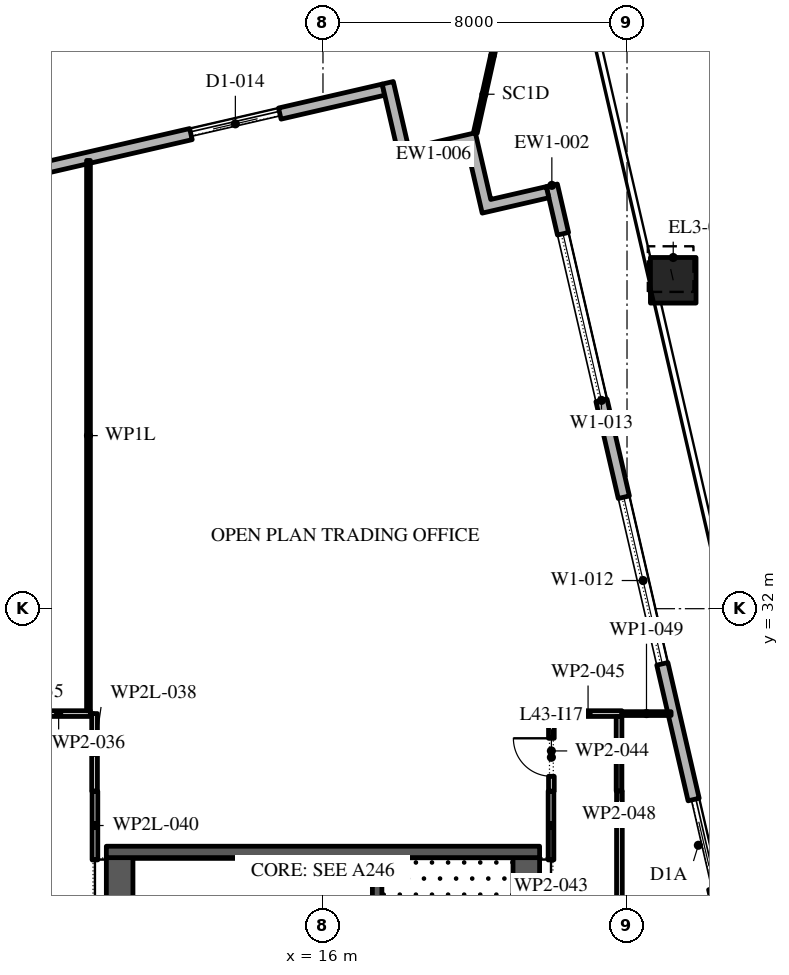
"""IFC4 building model, lengths in metres.
Left out: names, types, materials, properties, quantities, classifications, styles, units other than length and angle.
Written with IfcOpenShell. Run it as: python <this file> out.ifc"""

import sys

from ifc_helpers import new_model, si_unit, direction, frame, frame_2d, origin, origin_2d, place, context, subcontext, project, spatial, polyline, rectangle, outline, extrude, element, fill, save


model = new_model("IFC4")
c1 = context("Model", 3, precision=1e-05, world=origin(), true_north=direction((0.0, 1.0)))
c2 = subcontext(c1, "Body", "Model", "MODEL_VIEW")
j1 = project(units=[si_unit("LENGTHUNIT", "METRE"), si_unit("PLANEANGLEUNIT", "RADIAN")], contexts=[c1])
p1 = place(None, origin())
s1 = spatial("IfcSite", under=j1, at=p1, CompositionType="ELEMENT")
p2 = place(p1, origin())
s2 = spatial("IfcBuilding", under=s1, at=p2, CompositionType="ELEMENT")
p3 = place(p2, frame((0.0, 0.0, 196.8)))
s3 = spatial("IfcBuildingStorey", under=s2, at=p3, CompositionType="ELEMENT", Elevation=196.8)
p4 = place(p3, frame((25.216, 40.641, 0.0), z_axis=(-0.016176147103, 0.070038658424, 0.997413113304), x_axis=(-0.97435039746, -0.225036225904, 0.0)))
e1 = element("IfcColumn", 1, at=p4, inside=s3, PredefinedType="COLUMN", context=c2, shape_type="SweptSolid", body=[
    extrude(rectangle(XDim=1.2, YDim=1.2, at=origin_2d()), origin(), (0.0, 0.0, 1.0), 4.211),
])
p5 = place(p3, frame((33.157, -5.092, 0.0), z_axis=(0.0, 0.0, 1.0), x_axis=(-0.224950279389, 0.974370243697, 0.0)))
e2 = element("IfcWall", 2, at=p5, inside=s3, PredefinedType="STANDARD", context=c2, shape_type="SweptSolid", body=[
    extrude(rectangle(XDim=49.5, YDim=0.3, at=frame_2d((24.75, 0.0))), origin(), (0.0, 0.0, 1.0), 4.0),
])
p6 = place(p5, frame((2.207, 0.0, 0.0)))
e3 = element("IfcOpeningElement", 3, at=p6, cuts=e2, PredefinedType="OPENING", context=c2, shape_type="SweptSolid", body=[
    extrude(rectangle(XDim=2.4, YDim=3.125, at=frame_2d((1.2, 1.562))), frame((0.0, 0.16, 0.0), z_axis=(0.0, -1.0, 0.0), x_axis=(1.0, 0.0, 0.0)), (0.0, 0.0, 1.0), 0.32),
])
p7 = place(p5, frame((8.121, 0.0, 0.45)))
e4 = element("IfcOpeningElement", 4, at=p7, cuts=e2, PredefinedType="OPENING", context=c2, shape_type="SweptSolid", body=[
    extrude(rectangle(XDim=4.5, YDim=2.875, at=frame_2d((2.25, 1.438))), frame((0.0, 0.16, 0.0), z_axis=(0.0, -1.0, 0.0), x_axis=(1.0, 0.0, 0.0)), (0.0, 0.0, 1.0), 0.32),
])
p8 = place(p5, frame((15.236, 0.0, 0.45)))
e5 = element("IfcOpeningElement", 5, at=p8, cuts=e2, PredefinedType="OPENING", context=c2, shape_type="SweptSolid", body=[
    extrude(rectangle(XDim=4.5, YDim=2.875, at=frame_2d((2.25, 1.438))), frame((0.0, 0.16, 0.0), z_axis=(0.0, -1.0, 0.0), x_axis=(1.0, 0.0, 0.0)), (0.0, 0.0, 1.0), 0.32),
])
p9 = place(p5, frame((22.35, 0.0, 0.45)))
e6 = element("IfcOpeningElement", 6, at=p9, cuts=e2, PredefinedType="OPENING", context=c2, shape_type="SweptSolid", body=[
    extrude(rectangle(XDim=4.5, YDim=3.0, at=frame_2d((2.25, 1.5))), frame((0.0, 0.16, 0.0), z_axis=(0.0, -1.0, 0.0), x_axis=(1.0, 0.0, 0.0)), (0.0, 0.0, 1.0), 0.32),
])
p10 = place(p5, frame((30.514, 0.0, 0.0)))
e7 = element("IfcOpeningElement", 7, at=p10, cuts=e2, PredefinedType="OPENING", context=c2, shape_type="SweptSolid", body=[
    extrude(rectangle(XDim=2.4, YDim=3.45, at=frame_2d((1.2, 1.725))), frame((0.0, 0.16, 0.0), z_axis=(0.0, -1.0, 0.0), x_axis=(1.0, 0.0, 0.0)), (0.0, 0.0, 1.0), 0.32),
])
p11 = place(p5, frame((36.579, 0.0, 0.45)))
e8 = element("IfcOpeningElement", 8, at=p11, cuts=e2, PredefinedType="OPENING", context=c2, shape_type="SweptSolid", body=[
    extrude(rectangle(XDim=4.5, YDim=3.05, at=frame_2d((2.25, 1.525))), frame((0.0, 0.16, 0.0), z_axis=(0.0, -1.0, 0.0), x_axis=(1.0, 0.0, 0.0)), (0.0, 0.0, 1.0), 0.32),
])
p12 = place(p5, frame((43.693, 0.0, 0.45)))
e9 = element("IfcOpeningElement", 9, at=p12, cuts=e2, PredefinedType="OPENING", context=c2, shape_type="SweptSolid", body=[
    extrude(rectangle(XDim=4.5, YDim=3.05, at=frame_2d((2.25, 1.525))), frame((0.0, 0.16, 0.0), z_axis=(0.0, -1.0, 0.0), x_axis=(1.0, 0.0, 0.0)), (0.0, 0.0, 1.0), 0.32),
])
p13 = place(p3, frame((17.592, 45.657, 0.0), z_axis=(0.0, 0.0, 1.0), x_axis=(-0.974370243697, -0.224950279389, 0.0)))
e10 = element("IfcWall", 10, at=p13, inside=s3, PredefinedType="STANDARD", context=c2, shape_type="SweptSolid", body=[
    extrude(rectangle(XDim=49.5, YDim=0.3, at=frame_2d((24.75, 0.0))), origin(), (0.0, 0.0, 1.0), 4.0),
])
p14 = place(p13, frame((2.8, 0.0, 0.0)))
e11 = element("IfcOpeningElement", 11, at=p14, cuts=e10, PredefinedType="OPENING", context=c2, shape_type="SweptSolid", body=[
    extrude(rectangle(XDim=2.4, YDim=3.5, at=frame_2d((1.2, 1.75))), frame((0.0, 0.16, 0.0), z_axis=(0.0, -1.0, 0.0), x_axis=(1.0, 0.0, 0.0)), (0.0, 0.0, 1.0), 0.32),
])
p15 = place(p13, frame((9.9, 0.0, 0.45)))
e12 = element("IfcOpeningElement", 12, at=p15, cuts=e10, PredefinedType="OPENING", context=c2, shape_type="SweptSolid", body=[
    extrude(rectangle(XDim=4.5, YDim=2.45, at=frame_2d((2.25, 1.225))), frame((0.0, 0.16, 0.0), z_axis=(0.0, -1.0, 0.0), x_axis=(1.0, 0.0, 0.0)), (0.0, 0.0, 1.0), 0.32),
])
p16 = place(p13, frame((18.2, 0.0, 0.45)))
e13 = element("IfcOpeningElement", 13, at=p16, cuts=e10, PredefinedType="OPENING", context=c2, shape_type="SweptSolid", body=[
    extrude(rectangle(XDim=4.5, YDim=2.45, at=frame_2d((2.25, 1.225))), frame((0.0, 0.16, 0.0), z_axis=(0.0, -1.0, 0.0), x_axis=(1.0, 0.0, 0.0)), (0.0, 0.0, 1.0), 0.32),
])
p17 = place(p13, frame((26.5, 0.0, 0.45)))
e14 = element("IfcOpeningElement", 14, at=p17, cuts=e10, PredefinedType="OPENING", context=c2, shape_type="SweptSolid", body=[
    extrude(rectangle(XDim=4.5, YDim=2.525, at=frame_2d((2.25, 1.262))), frame((0.0, 0.16, 0.0), z_axis=(0.0, -1.0, 0.0), x_axis=(1.0, 0.0, 0.0)), (0.0, 0.0, 1.0), 0.32),
])
p18 = place(p13, frame((35.85, 0.0, 0.0)))
e15 = element("IfcOpeningElement", 15, at=p18, cuts=e10, PredefinedType="OPENING", context=c2, shape_type="SweptSolid", body=[
    extrude(rectangle(XDim=2.4, YDim=3.5, at=frame_2d((1.2, 1.75))), frame((0.0, 0.16, 0.0), z_axis=(0.0, -1.0, 0.0), x_axis=(1.0, 0.0, 0.0)), (0.0, 0.0, 1.0), 0.32),
])
p19 = place(p13, frame((43.1, 0.0, 0.45)))
e16 = element("IfcOpeningElement", 16, at=p19, cuts=e10, PredefinedType="OPENING", context=c2, shape_type="SweptSolid", body=[
    extrude(rectangle(XDim=4.5, YDim=2.675, at=frame_2d((2.25, 1.337))), frame((0.0, 0.16, 0.0), z_axis=(0.0, -1.0, 0.0), x_axis=(1.0, 0.0, 0.0)), (0.0, 0.0, 1.0), 0.32),
])
p20 = place(p3, origin())
e17 = element("IfcWall", 17, at=p20, inside=s3, PredefinedType="STANDARD", context=c2, shape_type="SweptSolid", body=[
    extrude(outline(polyline([(19.785, 44.162), (18.031, 43.757), (17.558, 45.803), (17.851, 45.871), (18.256, 44.117), (20.01, 44.522), (20.414, 42.768), (21.876, 43.105), (21.943, 42.813), (20.19, 42.408), (19.785, 44.162)])), origin(), (0.0, 0.0, 1.0), 4.0),
])
p21 = place(p3, frame((20.01, 44.522, -0.05), z_axis=(0.0, 0.0, 1.0), x_axis=(0.217129502509, 0.976142806735, 0.0)))
e18 = element("IfcWall", 18, at=p21, inside=s3, PredefinedType="STANDARD", context=c2, shape_type="SweptSolid", body=[
    extrude(rectangle(XDim=2.078, YDim=0.1, at=frame_2d((1.039, 0.0))), origin(), (0.0, 0.0, 1.0), 3.07),
])
p22 = place(p3, frame((21.35, -2.45, 0.0), z_axis=(0.0, 0.0, 1.0), x_axis=(0.0, 1.0, 0.0)))
e19 = element("IfcWall", 19, at=p22, inside=s3, PredefinedType="SHEAR", context=c2, shape_type="SweptSolid", body=[
    extrude(rectangle(XDim=27.9, YDim=0.7, at=frame_2d((13.95, 0.0))), origin(), (0.0, 0.0, 1.0), 4.0),
])
p23 = place(p22, frame((5.05, 0.0, 0.0)))
e20 = element("IfcOpeningElement", 20, at=p23, cuts=e19, PredefinedType="OPENING", context=c2, shape_type="SweptSolid", body=[
    extrude(rectangle(XDim=1.2, YDim=2.1, at=frame_2d((0.6, 1.05))), frame((0.0, 0.36, 0.0), z_axis=(0.0, -1.0, 0.0), x_axis=(1.0, 0.0, 0.0)), (0.0, 0.0, 1.0), 0.72),
])
p24 = place(p22, frame((21.65, 0.0, 0.0)))
e21 = element("IfcOpeningElement", 21, at=p24, cuts=e19, PredefinedType="OPENING", context=c2, shape_type="SweptSolid", body=[
    extrude(rectangle(XDim=1.2, YDim=2.1, at=frame_2d((0.6, 1.05))), frame((0.0, 0.36, 0.0), z_axis=(0.0, -1.0, 0.0), x_axis=(1.0, 0.0, 0.0)), (0.0, 0.0, 1.0), 0.72),
])
p25 = place(p3, frame((10.65, -2.45, 0.0), z_axis=(0.0, 0.0, 1.0), x_axis=(0.0, 1.0, 0.0)))
e22 = element("IfcWall", 22, at=p25, inside=s3, PredefinedType="SHEAR", context=c2, shape_type="SweptSolid", body=[
    extrude(rectangle(XDim=27.9, YDim=0.7, at=frame_2d((13.95, 0.0))), origin(), (0.0, 0.0, 1.0), 4.0),
])
p26 = place(p25, frame((23.65, 0.0, 0.0)))
e23 = element("IfcOpeningElement", 23, at=p26, cuts=e22, PredefinedType="OPENING", context=c2, shape_type="SweptSolid", body=[
    extrude(rectangle(XDim=2.4, YDim=2.1, at=frame_2d((1.2, 1.05))), frame((0.0, 0.36, 0.0), z_axis=(0.0, -1.0, 0.0), x_axis=(1.0, 0.0, 0.0)), (0.0, 0.0, 1.0), 0.72),
])
p27 = place(p25, frame((0.788, 0.0, 0.0)))
e24 = element("IfcOpeningElement", 24, at=p27, cuts=e22, PredefinedType="OPENING", context=c2, shape_type="SweptSolid", body=[
    extrude(rectangle(XDim=0.9, YDim=2.1, at=frame_2d((0.45, 1.05))), frame((0.0, 0.36, 0.0), z_axis=(0.0, -1.0, 0.0), x_axis=(1.0, 0.0, 0.0)), (0.0, 0.0, 1.0), 0.72),
])
p28 = place(p25, frame((3.962, 0.0, 0.0)))
e25 = element("IfcOpeningElement", 25, at=p28, cuts=e22, PredefinedType="OPENING", context=c2, shape_type="SweptSolid", body=[
    extrude(rectangle(XDim=1.0, YDim=2.1, at=frame_2d((0.5, 1.05))), frame((0.0, 0.36, 0.0), z_axis=(0.0, -1.0, 0.0), x_axis=(1.0, 0.0, 0.0)), (0.0, 0.0, 1.0), 0.72),
])
p29 = place(p3, frame((10.3, 25.6, 0.0), z_axis=(0.0, 0.0, 1.0), x_axis=(1.0, 0.0, 0.0)))
e26 = element("IfcWall", 26, at=p29, inside=s3, PredefinedType="SHEAR", context=c2, shape_type="SweptSolid", body=[
    extrude(rectangle(XDim=11.4, YDim=0.3, at=frame_2d((5.7, 0.0))), origin(), (0.0, 0.0, 1.0), 4.0),
])
p30 = place(p3, frame((17.425, 19.15, 0.0), z_axis=(0.0, 0.0, 1.0), x_axis=(0.0, 1.0, 0.0)))
e27 = element("IfcWall", 27, at=p30, inside=s3, PredefinedType="SHEAR", context=c2, shape_type="SweptSolid", body=[
    extrude(rectangle(XDim=6.3, YDim=0.25, at=frame_2d((3.15, 0.0))), origin(), (0.0, 0.0, 1.0), 4.0),
])
p31 = place(p30, frame((0.05, 0.0, 0.0)))
e28 = element("IfcOpeningElement", 28, at=p31, cuts=e27, PredefinedType="OPENING", context=c2, shape_type="SweptSolid", body=[
    extrude(rectangle(XDim=1.2, YDim=2.1, at=frame_2d((0.6, 1.05))), frame((0.0, 0.135, 0.0), z_axis=(0.0, -1.0, 0.0), x_axis=(1.0, 0.0, 0.0)), (0.0, 0.0, 1.0), 0.27),
])
p32 = place(p3, frame((8.21, 29.24, 0.0), z_axis=(0.0, 0.0, 1.0), x_axis=(1.0, 0.0, 0.0)))
e29 = element("IfcWall", 29, at=p32, inside=s3, PredefinedType="PARTITIONING", context=c2, shape_type="SweptSolid", body=[
    extrude(rectangle(XDim=1.67, YDim=0.15, at=frame_2d((0.835, 0.0))), origin(), (0.0, 0.0, 1.0), 4.0),
])
p33 = place(p3, frame((9.83, 43.794, 0.0), z_axis=(0.0, 0.0, 1.0), x_axis=(0.0, -1.0, 0.0)))
e30 = element("IfcWall", 30, at=p33, inside=s3, PredefinedType="PARTITIONING", context=c2, shape_type="SweptSolid", body=[
    extrude(rectangle(XDim=14.479, YDim=0.1, at=frame_2d((7.24, 0.0))), origin(), (0.0, 0.0, 1.0), 3.02),
])
p34 = place(p3, frame((9.99, 29.24, 0.0), z_axis=(0.0, 0.0, 1.0), x_axis=(0.0, -1.0, 0.0)))
e31 = element("IfcWall", 31, at=p34, inside=s3, PredefinedType="PARTITIONING", context=c2, shape_type="SweptSolid", body=[
    extrude(rectangle(XDim=2.04, YDim=0.15, at=frame_2d((1.02, 0.0))), origin(), (0.0, 0.0, 1.0), 3.02),
])
p35 = place(p3, frame((10.0, 27.2, 0.0), z_axis=(0.0, 0.0, 1.0), x_axis=(0.0, -1.0, 0.0)))
e32 = element("IfcWall", 32, at=p35, inside=s3, PredefinedType="PARTITIONING", context=c2, shape_type="SweptSolid", body=[
    extrude(rectangle(XDim=1.81, YDim=0.15, at=frame_2d((0.905, 0.0))), origin(), (0.0, 0.0, 1.0), 3.02),
])
p36 = place(p3, frame((22.0, 25.39, 0.0), z_axis=(0.0, 0.0, 1.0), x_axis=(0.0, 1.0, 0.0)))
e33 = element("IfcWall", 33, at=p36, inside=s3, PredefinedType="PARTITIONING", context=c2, shape_type="SweptSolid", body=[
    extrude(rectangle(XDim=1.81, YDim=0.15, at=frame_2d((0.905, 0.0))), origin(), (0.0, 0.0, 1.0), 4.0),
])
p37 = place(p3, frame((22.01, 27.2, 0.0), z_axis=(0.0, 0.0, 1.0), x_axis=(0.0, 1.0, 0.0)))
e34 = element("IfcWall", 34, at=p37, inside=s3, PredefinedType="PARTITIONING", context=c2, shape_type="SweptSolid", body=[
    extrude(rectangle(XDim=2.115, YDim=0.15, at=frame_2d((1.058, 0.0))), origin(), (0.0, 0.0, 1.0), 4.0),
])
p38 = place(p37, frame((0.39, 0.0, 0.0)))
e35 = element("IfcOpeningElement", 35, at=p38, cuts=e34, PredefinedType="OPENING", context=c2, shape_type="SweptSolid", body=[
    extrude(rectangle(XDim=1.0, YDim=2.1, at=frame_2d((0.5, 1.05))), frame((0.0, 0.085, 0.0), z_axis=(0.0, -1.0, 0.0), x_axis=(1.0, 0.0, 0.0)), (0.0, 0.0, 1.0), 0.17),
])
p39 = place(p3, frame((22.085, 29.24, 0.0), z_axis=(0.0, 0.0, 1.0), x_axis=(1.0, 0.0, 0.0)))
e36 = element("IfcWall", 36, at=p39, inside=s3, PredefinedType="PARTITIONING", context=c2, shape_type="SweptSolid", body=[
    extrude(rectangle(XDim=1.78, YDim=0.15, at=frame_2d((0.89, 0.0))), origin(), (0.0, 0.0, 1.0), 4.0),
])
p40 = place(p3, frame((23.79, 29.165, 0.0), z_axis=(0.0, 0.0, 1.0), x_axis=(0.0, -1.0, 0.0)))
e37 = element("IfcWall", 37, at=p40, inside=s3, PredefinedType="PARTITIONING", context=c2, shape_type="SweptSolid", body=[
    extrude(rectangle(XDim=1.965, YDim=0.15, at=frame_2d((0.982, 0.0))), origin(), (0.0, 0.0, 1.0), 4.0),
])
p41 = place(p3, frame((23.865, 29.24, 0.0), z_axis=(0.0, 0.0, 1.0), x_axis=(1.0, 0.0, 0.0)))
e38 = element("IfcWall", 38, at=p41, inside=s3, PredefinedType="PARTITIONING", context=c2, shape_type="SweptSolid", body=[
    extrude(rectangle(XDim=1.295, YDim=0.1, at=frame_2d((0.647, 0.0))), origin(), (0.0, 0.0, 1.0), 4.0),
])
p42 = place(p3, frame((23.8, 27.2, 0.0), z_axis=(0.0, 0.0, 1.0), x_axis=(0.0, -1.0, 0.0)))
e39 = element("IfcWall", 39, at=p42, inside=s3, PredefinedType="PARTITIONING", context=c2, shape_type="SweptSolid", body=[
    extrude(rectangle(XDim=10.7, YDim=0.15, at=frame_2d((5.35, 0.0))), origin(), (0.0, 0.0, 1.0), 4.0),
])
p43 = place(p42, frame((6.0, 0.0, 0.0)))
e40 = element("IfcOpeningElement", 40, at=p43, cuts=e39, PredefinedType="OPENING", context=c2, shape_type="SweptSolid", body=[
    extrude(rectangle(XDim=1.0, YDim=2.1, at=frame_2d((0.5, 1.05))), frame((0.0, 0.085, 0.0), z_axis=(0.0, -1.0, 0.0), x_axis=(1.0, 0.0, 0.0)), (0.0, 0.0, 1.0), 0.17),
])
p44 = place(p3, frame((20.461, 46.55, -0.05), z_axis=(0.0, 0.0, 1.0), x_axis=(0.217256107867, 0.976114636503, 0.0)))
e41 = element("IfcWall", 41, at=p44, inside=s3, PredefinedType="STANDARD", context=c2, shape_type="SweptSolid", body=[
    extrude(rectangle(XDim=2.619, YDim=0.1, at=frame_2d((1.31, 0.0))), origin(), (0.0, 0.0, 1.0), 4.05),
])
p45 = place(p10, origin())
e42 = element("IfcDoor", 42, at=p45, inside=s3, OperationType="DOUBLE_DOOR_SLIDING", PredefinedType="DOOR", context=c2, shape_type="SweptSolid", body=[
    extrude(rectangle(XDim=2.4, YDim=3.45, at=frame_2d((1.2, 1.725))), frame((0.0, 0.025, 0.0), z_axis=(0.0, -1.0, 0.0), x_axis=(1.0, 0.0, 0.0)), (0.0, 0.0, 1.0), 0.05),
])
fill(e7, e42)
p46 = place(p11, origin())
e43 = element("IfcWindow", 43, at=p46, inside=s3, PartitioningType="DOUBLE_PANEL_VERTICAL", PredefinedType="WINDOW", context=c2, shape_type="SweptSolid", body=[
    extrude(rectangle(XDim=4.5, YDim=3.05, at=frame_2d((2.25, 1.525))), frame((0.0, 0.03, 0.0), z_axis=(0.0, -1.0, 0.0), x_axis=(1.0, 0.0, 0.0)), (0.0, 0.0, 1.0), 0.06),
])
fill(e8, e43)
p47 = place(p12, origin())
e44 = element("IfcWindow", 44, at=p47, inside=s3, PartitioningType="DOUBLE_PANEL_VERTICAL", PredefinedType="WINDOW", context=c2, shape_type="SweptSolid", body=[
    extrude(rectangle(XDim=4.5, YDim=3.05, at=frame_2d((2.25, 1.525))), frame((0.0, 0.03, 0.0), z_axis=(0.0, -1.0, 0.0), x_axis=(1.0, 0.0, 0.0)), (0.0, 0.0, 1.0), 0.06),
])
fill(e9, e44)
p48 = place(p14, origin())
e45 = element("IfcDoor", 45, at=p48, inside=s3, OperationType="DOUBLE_DOOR_SLIDING", PredefinedType="DOOR", context=c2, shape_type="SweptSolid", body=[
    extrude(rectangle(XDim=2.4, YDim=3.5, at=frame_2d((1.2, 1.75))), frame((0.0, 0.025, 0.0), z_axis=(0.0, -1.0, 0.0), x_axis=(1.0, 0.0, 0.0)), (0.0, 0.0, 1.0), 0.05),
])
fill(e11, e45)
p49 = place(p38, origin())
e46 = element("IfcDoor", 46, at=p49, inside=s3, OperationType="SINGLE_SWING_LEFT", PredefinedType="DOOR", context=c2, shape_type="SweptSolid", body=[
    extrude(rectangle(XDim=1.0, YDim=2.1, at=frame_2d((0.5, 1.05))), frame((0.0, 0.025, 0.0), z_axis=(0.0, -1.0, 0.0), x_axis=(1.0, 0.0, 0.0)), (0.0, 0.0, 1.0), 0.05),
])
fill(e35, e46)
save(model, sys.argv[1])
